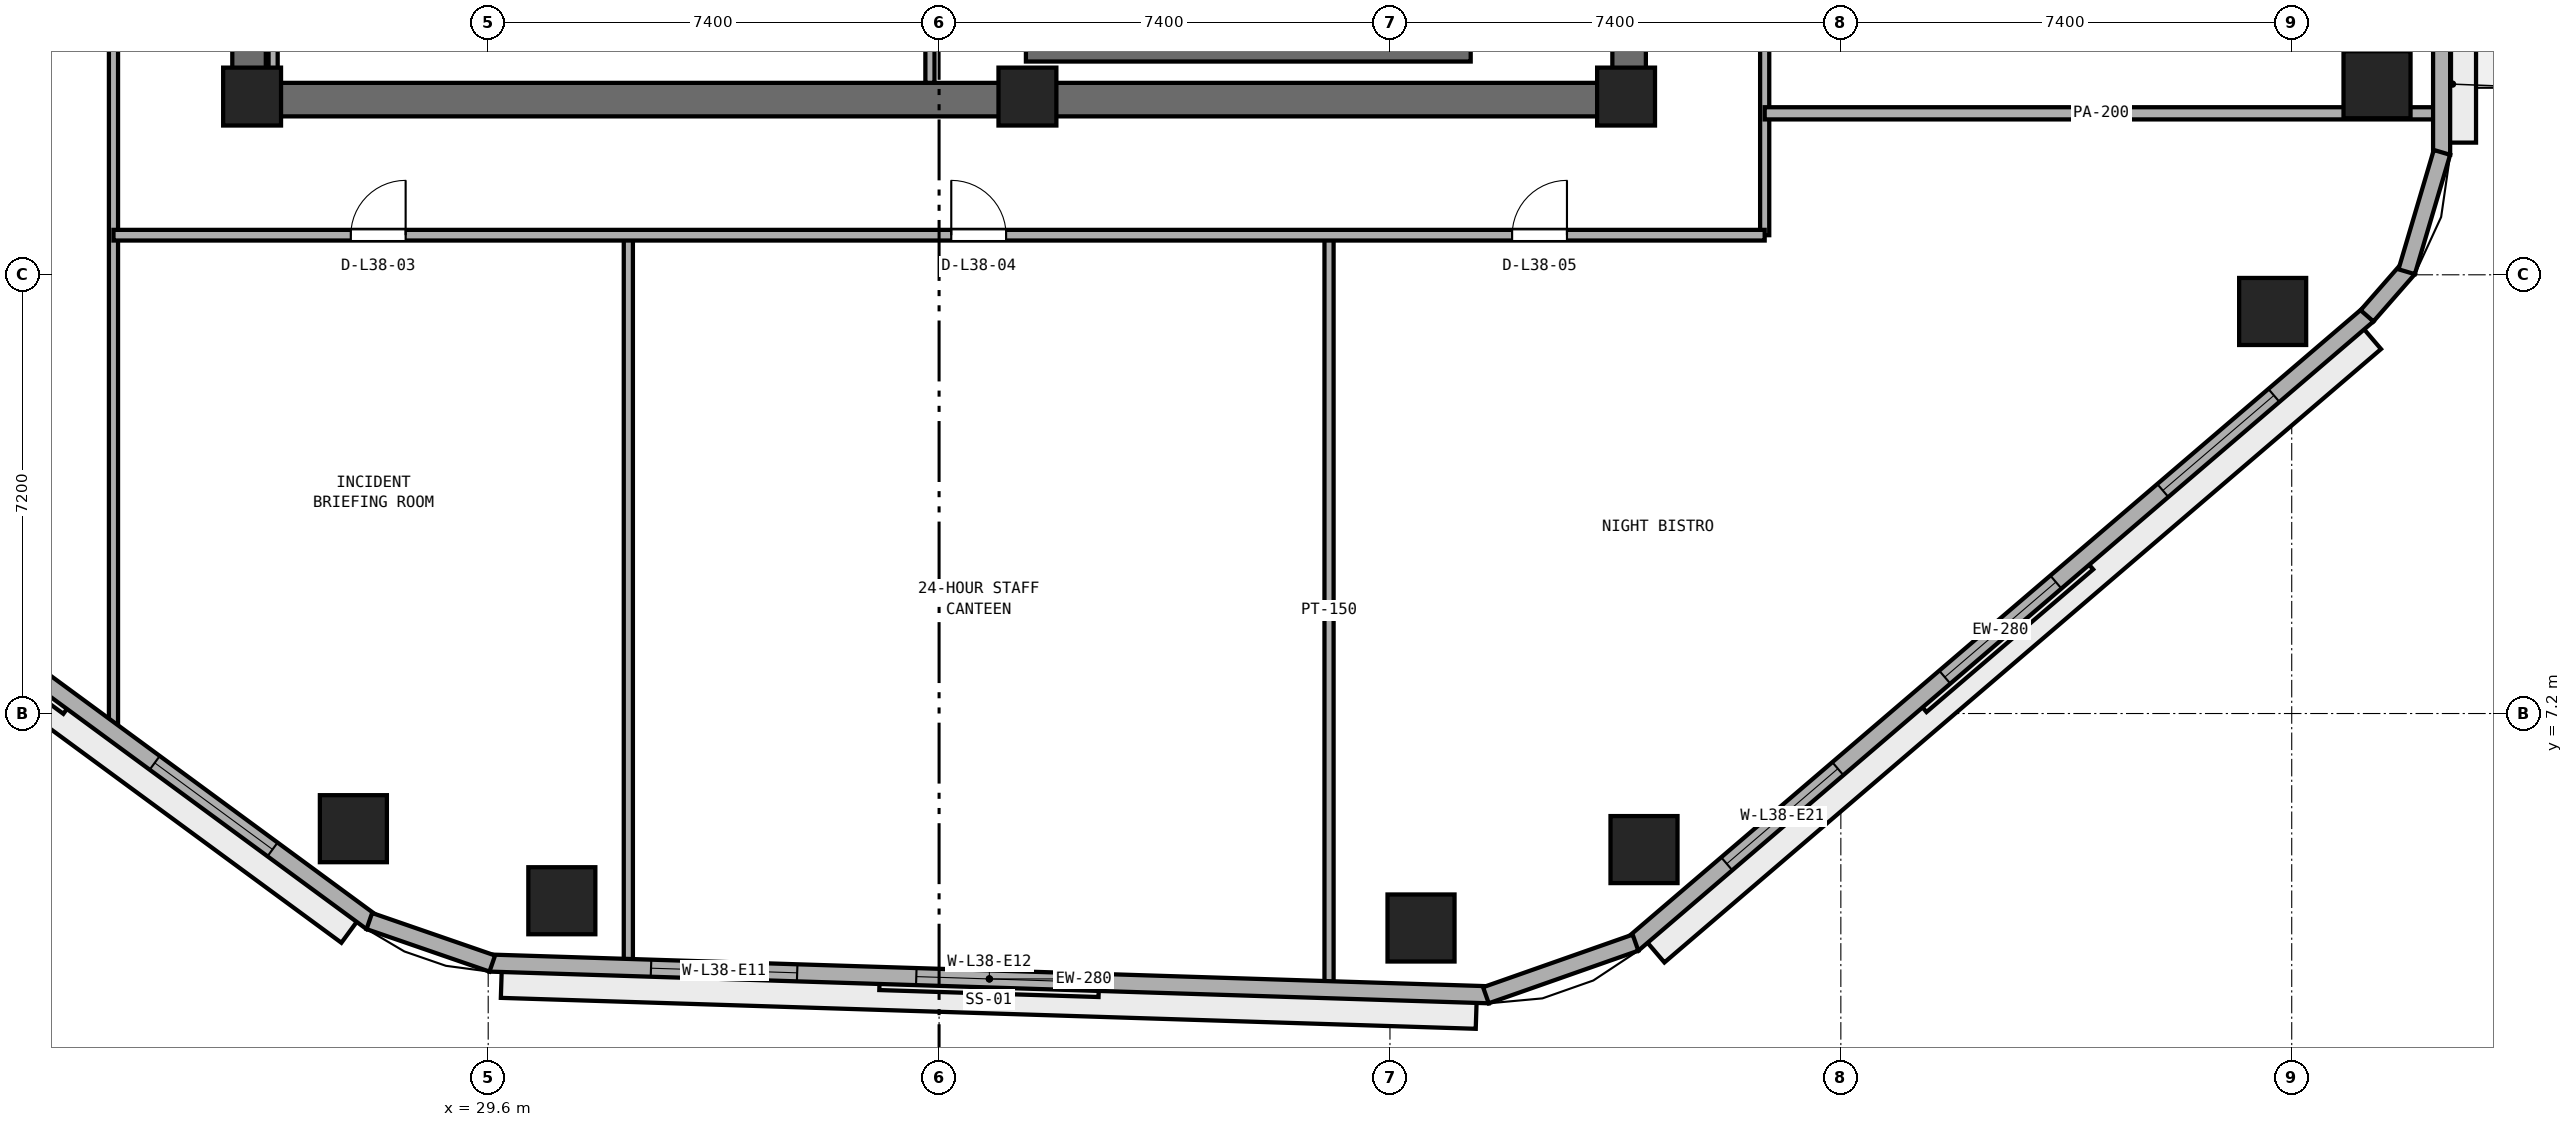
"""IFC4 building model, lengths in metres.
Left out: names, types, materials, properties, quantities, classifications, styles, units other than length and angle.
Written with IfcOpenShell. Run it as: python <this file> out.ifc"""

import sys

from ifc_helpers import new_model, si_unit, direction, frame, frame_2d, origin, origin_2d, place, context, subcontext, project, spatial, rectangle, extrude, element, fill, save


model = new_model("IFC4")
c1 = context("Model", 3, precision=1e-05, world=origin(), true_north=direction((0.0, 1.0)))
c2 = subcontext(c1, "Body", "Model", "MODEL_VIEW")
j1 = project(units=[si_unit("LENGTHUNIT", "METRE"), si_unit("PLANEANGLEUNIT", "RADIAN")], contexts=[c1])
p1 = place(None, origin())
s1 = spatial("IfcSite", under=j1, at=p1, CompositionType="ELEMENT")
p2 = place(p1, origin())
s2 = spatial("IfcBuilding", under=s1, at=p2, CompositionType="ELEMENT")
p3 = place(p2, frame((0.0, 0.0, 151.6)))
s3 = spatial("IfcBuildingStorey", under=s2, at=p3, CompositionType="ELEMENT", Elevation=151.6)
p4 = place(p3, frame((25.4, 17.275, 0.0), z_axis=(0.0, 0.0, 1.0), x_axis=(1.0, 0.0, 0.0)))
e1 = element("IfcWall", 1, at=p4, inside=s3, PredefinedType="SHEAR", context=c2, shape_type="SweptSolid", body=[
    extrude(rectangle(XDim=23.2, YDim=0.55, at=frame_2d((11.6, 0.0))), origin(), (0.0, 0.0, 1.0), 3.54),
])
p5 = place(p3, frame((25.675, 17.55, 0.0), z_axis=(0.0, 0.0, 1.0), x_axis=(0.0, 1.0, 0.0)))
e2 = element("IfcWall", 2, at=p5, inside=s3, PredefinedType="SHEAR", context=c2, shape_type="SweptSolid", body=[
    extrude(rectangle(XDim=15.3, YDim=0.55, at=frame_2d((7.65, 0.0))), origin(), (0.0, 0.0, 1.0), 3.54),
])
p6 = place(p5, frame((6.9, 0.0, 0.0)))
e3 = element("IfcOpeningElement", 3, at=p6, cuts=e2, PredefinedType="OPENING", context=c2, shape_type="SweptSolid", body=[
    extrude(rectangle(XDim=1.5, YDim=2.15, at=frame_2d((0.75, 1.075))), frame((0.0, 0.285, 0.0), z_axis=(0.0, -1.0, 0.0), x_axis=(1.0, 0.0, 0.0)), (0.0, 0.0, 1.0), 0.57),
])
p7 = place(p3, frame((48.325, 17.55, 0.0), z_axis=(0.0, 0.0, 1.0), x_axis=(0.0, 1.0, 0.0)))
e4 = element("IfcWall", 4, at=p7, inside=s3, PredefinedType="SHEAR", context=c2, shape_type="SweptSolid", body=[
    extrude(rectangle(XDim=15.3, YDim=0.55, at=frame_2d((7.65, 0.0))), origin(), (0.0, 0.0, 1.0), 3.54),
])
p8 = place(p7, frame((5.75, 0.0, 0.0)))
e5 = element("IfcOpeningElement", 5, at=p8, cuts=e4, PredefinedType="OPENING", context=c2, shape_type="SweptSolid", body=[
    extrude(rectangle(XDim=1.5, YDim=2.15, at=frame_2d((0.75, 1.075))), frame((0.0, 0.285, 0.0), z_axis=(0.0, -1.0, 0.0), x_axis=(1.0, 0.0, 0.0)), (0.0, 0.0, 1.0), 0.57),
])
for number, where, z_axis, x_axis in (
    (6, (25.725, 17.325, 0.0), (0.0, 0.0, 1.0), (1.0, 0.0, 0.0)),
    (7, (38.45, 17.325, 0.0), (0.0, 0.0, 1.0), (1.0, 0.0, 0.0)),
    (8, (48.275, 17.325, 0.0), (0.0, 0.0, 1.0), (1.0, 0.0, 0.0)),
):
    element("IfcColumn", number, at=place(p3, frame(where, z_axis=z_axis, x_axis=x_axis)), inside=s3, PredefinedType="PILASTER", context=c2, shape_type="SweptSolid", body=[
        extrude(rectangle(XDim=0.95, YDim=0.95, at=origin_2d()), origin(), (0.0, 0.0, 1.0), 3.8),
    ])
for number, where, z_axis, x_axis in (
    (9, (30.809, 4.127, 0.0), (0.0, 0.0, 1.0), (1.0, 0.0, 0.0)),
    (10, (44.91, 3.68, 0.0), (0.0, 0.0, 1.0), (1.0, 0.0, 0.0)),
    (11, (48.57, 4.967, 0.0), (0.0, 0.0, 1.0), (1.0, 0.0, 0.0)),
    (12, (58.887, 13.798, 0.0), (0.0, 0.0, 1.0), (1.0, 0.0, 0.0)),
    (13, (60.6, 17.519, 0.0), (0.0, 0.0, 1.0), (1.0, 0.0, 0.0)),
    (14, (27.387, 5.31, 0.0), (0.0, 0.0, 1.0), (1.0, 0.0, 0.0)),
):
    element("IfcColumn", number, at=place(p3, frame(where, z_axis=z_axis, x_axis=x_axis)), inside=s3, PredefinedType="COLUMN", context=c2, shape_type="SweptSolid", body=[
        extrude(rectangle(XDim=1.1, YDim=1.1, at=origin_2d()), origin(), (0.0, 0.0, 1.0), 3.8),
    ])
p9 = place(p3, frame((38.425, 18.025, 0.0), z_axis=(0.0, 0.0, 1.0), x_axis=(1.0, 0.0, 0.0)))
e15 = element("IfcWall", 15, at=p9, inside=s3, PredefinedType="SHEAR", context=c2, shape_type="SweptSolid", body=[
    extrude(rectangle(XDim=7.3, YDim=0.25, at=frame_2d((3.65, 0.0))), origin(), (0.0, 0.0, 1.0), 3.54),
])
p10 = place(p3, frame((26.07, 17.55, 0.0), z_axis=(0.0, 0.0, 1.0), x_axis=(0.0, 1.0, 0.0)))
e16 = element("IfcWall", 16, at=p10, inside=s3, PredefinedType="PARTITIONING", context=c2, shape_type="SweptSolid", body=[
    extrude(rectangle(XDim=2.2, YDim=0.15, at=frame_2d((1.1, 0.0))), origin(), (0.0, 0.0, 1.0), 2.64),
])
p11 = place(p3, frame((36.85, 17.55, 0.0), z_axis=(0.0, 0.0, 1.0), x_axis=(0.0, 1.0, 0.0)))
e17 = element("IfcWall", 17, at=p11, inside=s3, PredefinedType="PARTITIONING", context=c2, shape_type="SweptSolid", body=[
    extrude(rectangle(XDim=2.2, YDim=0.15, at=frame_2d((1.1, 0.0))), origin(), (0.0, 0.0, 1.0), 3.54),
])
p12 = place(p3, frame((50.55, 15.05, 0.0), z_axis=(0.0, 0.0, 1.0), x_axis=(0.0, 1.0, 0.0)))
e18 = element("IfcWall", 18, at=p12, inside=s3, PredefinedType="PARTITIONING", context=c2, shape_type="SweptSolid", body=[
    extrude(rectangle(XDim=8.8, YDim=0.15, at=frame_2d((4.4, 0.0))), origin(), (0.0, 0.0, 1.0), 3.54),
])
p13 = place(p3, frame((43.4, 2.732, 0.0), z_axis=(0.0, 0.0, 1.0), x_axis=(0.0, 1.0, 0.0)))
e19 = element("IfcWall", 19, at=p13, inside=s3, PredefinedType="PARTITIONING", context=c2, shape_type="SweptSolid", body=[
    extrude(rectangle(XDim=12.318, YDim=0.15, at=frame_2d((6.159, 0.0))), origin(), (0.0, 0.0, 1.0), 3.54),
])
p14 = place(p3, frame((31.9, 3.097, 0.0), z_axis=(0.0, 0.0, 1.0), x_axis=(0.0, 1.0, 0.0)))
e20 = element("IfcWall", 20, at=p14, inside=s3, PredefinedType="PARTITIONING", context=c2, shape_type="SweptSolid", body=[
    extrude(rectangle(XDim=11.953, YDim=0.15, at=frame_2d((5.976, 0.0))), origin(), (0.0, 0.0, 1.0), 3.54),
])
p15 = place(p3, frame((23.45, 6.854, 0.0), z_axis=(0.0, 0.0, 1.0), x_axis=(0.0, 1.0, 0.0)))
e21 = element("IfcWall", 21, at=p15, inside=s3, PredefinedType="PARTITIONING", context=c2, shape_type="SweptSolid", body=[
    extrude(rectangle(XDim=16.996, YDim=0.15, at=frame_2d((8.498, 0.0))), origin(), (0.0, 0.0, 1.0), 3.54),
])
p16 = place(p3, frame((23.45, 15.05, 0.0), z_axis=(0.0, 0.0, 1.0), x_axis=(1.0, 0.0, 0.0)))
e22 = element("IfcWall", 22, at=p16, inside=s3, PredefinedType="PARTITIONING", context=c2, shape_type="SweptSolid", body=[
    extrude(rectangle(XDim=27.1, YDim=0.175, at=frame_2d((13.55, 0.0))), origin(), (0.0, 0.0, 1.0), 3.54),
])
p17 = place(p16, frame((3.895, 0.0, 0.0)))
e23 = element("IfcOpeningElement", 23, at=p17, cuts=e22, PredefinedType="OPENING", context=c2, shape_type="SweptSolid", body=[
    extrude(rectangle(XDim=0.9, YDim=2.1, at=frame_2d((0.45, 1.05))), frame((0.0, 0.097, 0.0), z_axis=(0.0, -1.0, 0.0), x_axis=(1.0, 0.0, 0.0)), (0.0, 0.0, 1.0), 0.195),
])
p18 = place(p16, frame((13.75, 0.0, 0.0)))
e24 = element("IfcOpeningElement", 24, at=p18, cuts=e22, PredefinedType="OPENING", context=c2, shape_type="SweptSolid", body=[
    extrude(rectangle(XDim=0.9, YDim=2.1, at=frame_2d((0.45, 1.05))), frame((0.0, 0.097, 0.0), z_axis=(0.0, -1.0, 0.0), x_axis=(1.0, 0.0, 0.0)), (0.0, 0.0, 1.0), 0.195),
])
p19 = place(p16, frame((22.955, 0.0, 0.0)))
e25 = element("IfcOpeningElement", 25, at=p19, cuts=e22, PredefinedType="OPENING", context=c2, shape_type="SweptSolid", body=[
    extrude(rectangle(XDim=0.9, YDim=2.1, at=frame_2d((0.45, 1.05))), frame((0.0, 0.097, 0.0), z_axis=(0.0, -1.0, 0.0), x_axis=(1.0, 0.0, 0.0)), (0.0, 0.0, 1.0), 0.195),
])
p20 = place(p3, frame((50.55, 17.05, 0.0), z_axis=(0.0, 0.0, 1.0), x_axis=(1.0, 0.0, 0.0)))
e26 = element("IfcWall", 26, at=p20, inside=s3, PredefinedType="PARTITIONING", context=c2, shape_type="SweptSolid", body=[
    extrude(rectangle(XDim=11.045, YDim=0.2, at=frame_2d((5.522, 0.0))), origin(), (0.0, 0.0, 1.0), 3.54),
])
p21 = place(p3, frame((29.625, 3.104, 0.0), z_axis=(0.0, 0.0, 1.0), x_axis=(0.99949718661, -0.031707632487, 0.0)))
e27 = element("IfcWall", 27, at=p21, inside=s3, PredefinedType="STANDARD", context=c2, shape_type="SweptSolid", body=[
    extrude(rectangle(XDim=16.408, YDim=0.28, at=frame_2d((8.204, 0.0))), origin(), (0.0, 0.0, 1.0), 3.54),
])
p22 = place(p21, frame((2.648, 0.0, 0.9)))
e28 = element("IfcOpeningElement", 28, at=p22, cuts=e27, PredefinedType="OPENING", context=c2, shape_type="SweptSolid", body=[
    extrude(rectangle(XDim=2.4, YDim=1.75, at=frame_2d((1.2, 0.875))), frame((0.0, 0.15, 0.0), z_axis=(0.0, -1.0, 0.0), x_axis=(1.0, 0.0, 0.0)), (0.0, 0.0, 1.0), 0.3),
])
p23 = place(p21, frame((7.004, 0.0, 0.9)))
e29 = element("IfcOpeningElement", 29, at=p23, cuts=e27, PredefinedType="OPENING", context=c2, shape_type="SweptSolid", body=[
    extrude(rectangle(XDim=2.4, YDim=1.75, at=frame_2d((1.2, 0.875))), frame((0.0, 0.15, 0.0), z_axis=(0.0, -1.0, 0.0), x_axis=(1.0, 0.0, 0.0)), (0.0, 0.0, 1.0), 0.3),
])
p24 = place(p3, frame((48.385, 3.414, 0.0), z_axis=(0.0, 0.0, 1.0), x_axis=(0.759700260779, 0.650273414628, 0.0)))
e30 = element("IfcWall", 30, at=p24, inside=s3, PredefinedType="STANDARD", context=c2, shape_type="SweptSolid", body=[
    extrude(rectangle(XDim=15.881, YDim=0.28, at=frame_2d((7.94, 0.0))), origin(), (0.0, 0.0, 1.0), 3.54),
])
p25 = place(p24, frame((2.03, 0.0, 0.9)))
e31 = element("IfcOpeningElement", 31, at=p25, cuts=e30, PredefinedType="OPENING", context=c2, shape_type="SweptSolid", body=[
    extrude(rectangle(XDim=2.4, YDim=1.75, at=frame_2d((1.2, 0.875))), frame((0.0, 0.15, 0.0), z_axis=(0.0, -1.0, 0.0), x_axis=(1.0, 0.0, 0.0)), (0.0, 0.0, 1.0), 0.3),
])
p26 = place(p24, frame((6.74, 0.0, 0.9)))
e32 = element("IfcOpeningElement", 32, at=p26, cuts=e30, PredefinedType="OPENING", context=c2, shape_type="SweptSolid", body=[
    extrude(rectangle(XDim=2.4, YDim=1.75, at=frame_2d((1.2, 0.875))), frame((0.0, 0.15, 0.0), z_axis=(0.0, -1.0, 0.0), x_axis=(1.0, 0.0, 0.0)), (0.0, 0.0, 1.0), 0.3),
])
p27 = place(p24, frame((11.451, 0.0, 0.9)))
e33 = element("IfcOpeningElement", 33, at=p27, cuts=e30, PredefinedType="OPENING", context=c2, shape_type="SweptSolid", body=[
    extrude(rectangle(XDim=2.4, YDim=1.75, at=frame_2d((1.2, 0.875))), frame((0.0, 0.15, 0.0), z_axis=(0.0, -1.0, 0.0), x_axis=(1.0, 0.0, 0.0)), (0.0, 0.0, 1.0), 0.3),
])
p28 = place(p3, frame((61.66, 16.369, 0.0), z_axis=(0.0, 0.0, 1.0), x_axis=(0.0, 1.0, 0.0)))
e34 = element("IfcWall", 34, at=p28, inside=s3, PredefinedType="STANDARD", context=c2, shape_type="SweptSolid", body=[
    extrude(rectangle(XDim=18.902, YDim=0.28, at=frame_2d((9.451, 0.0))), origin(), (0.0, 0.0, 1.0), 3.54),
])
p29 = place(p28, frame((8.601, 0.0, 0.0)))
e35 = element("IfcOpeningElement", 35, at=p29, cuts=e34, PredefinedType="OPENING", context=c2, shape_type="SweptSolid", body=[
    extrude(rectangle(XDim=1.1, YDim=2.2, at=frame_2d((0.55, 1.1))), frame((0.0, 0.15, 0.0), z_axis=(0.0, -1.0, 0.0), x_axis=(1.0, 0.0, 0.0)), (0.0, 0.0, 1.0), 0.3),
])
p30 = place(p28, frame((2.284, 0.0, 0.9)))
e36 = element("IfcOpeningElement", 36, at=p30, cuts=e34, PredefinedType="OPENING", context=c2, shape_type="SweptSolid", body=[
    extrude(rectangle(XDim=2.4, YDim=1.75, at=frame_2d((1.2, 0.875))), frame((0.0, 0.15, 0.0), z_axis=(0.0, -1.0, 0.0), x_axis=(1.0, 0.0, 0.0)), (0.0, 0.0, 1.0), 0.3),
])
p31 = place(p28, frame((14.219, 0.0, 0.9)))
e37 = element("IfcOpeningElement", 37, at=p31, cuts=e34, PredefinedType="OPENING", context=c2, shape_type="SweptSolid", body=[
    extrude(rectangle(XDim=2.4, YDim=1.75, at=frame_2d((1.2, 0.875))), frame((0.0, 0.15, 0.0), z_axis=(0.0, -1.0, 0.0), x_axis=(1.0, 0.0, 0.0)), (0.0, 0.0, 1.0), 0.3),
])
p32 = place(p3, frame((14.951, 13.134, 0.0), z_axis=(0.0, 0.0, 1.0), x_axis=(0.805804940328, -0.592181051827, 0.0)))
e38 = element("IfcWall", 38, at=p32, inside=s3, PredefinedType="STANDARD", context=c2, shape_type="SweptSolid", body=[
    extrude(rectangle(XDim=15.804, YDim=0.28, at=frame_2d((7.902, 0.0))), origin(), (0.0, 0.0, 1.0), 3.54),
])
p33 = place(p32, frame((2.017, 0.0, 0.9)))
e39 = element("IfcOpeningElement", 39, at=p33, cuts=e38, PredefinedType="OPENING", context=c2, shape_type="SweptSolid", body=[
    extrude(rectangle(XDim=2.4, YDim=1.75, at=frame_2d((1.2, 0.875))), frame((0.0, 0.15, 0.0), z_axis=(0.0, -1.0, 0.0), x_axis=(1.0, 0.0, 0.0)), (0.0, 0.0, 1.0), 0.3),
])
p34 = place(p32, frame((6.702, 0.0, 0.9)))
e40 = element("IfcOpeningElement", 40, at=p34, cuts=e38, PredefinedType="OPENING", context=c2, shape_type="SweptSolid", body=[
    extrude(rectangle(XDim=2.4, YDim=1.75, at=frame_2d((1.2, 0.875))), frame((0.0, 0.15, 0.0), z_axis=(0.0, -1.0, 0.0), x_axis=(1.0, 0.0, 0.0)), (0.0, 0.0, 1.0), 0.3),
])
p35 = place(p32, frame((11.387, 0.0, 0.9)))
e41 = element("IfcOpeningElement", 41, at=p35, cuts=e38, PredefinedType="OPENING", context=c2, shape_type="SweptSolid", body=[
    extrude(rectangle(XDim=2.4, YDim=1.75, at=frame_2d((1.2, 0.875))), frame((0.0, 0.15, 0.0), z_axis=(0.0, -1.0, 0.0), x_axis=(1.0, 0.0, 0.0)), (0.0, 0.0, 1.0), 0.3),
])
p36 = place(p3, frame((45.975, 2.576, 0.0), z_axis=(0.0, 0.0, 1.0), x_axis=(0.943377643365, 0.331720698781, 0.0)))
e42 = element("IfcWall", 42, at=p36, inside=s3, PredefinedType="STANDARD", context=c2, shape_type="SweptSolid", body=[
    extrude(rectangle(XDim=2.603, YDim=0.28, at=frame_2d((1.301, 0.0))), origin(), (0.0, 0.0, 1.0), 3.54),
])
p37 = place(p3, frame((60.436, 13.727, 0.0), z_axis=(0.0, 0.0, 1.0), x_axis=(0.658571618609, 0.752518055041, 0.0)))
e43 = element("IfcWall", 43, at=p37, inside=s3, PredefinedType="STANDARD", context=c2, shape_type="SweptSolid", body=[
    extrude(rectangle(XDim=1.032, YDim=0.28, at=frame_2d((0.516, 0.0))), origin(), (0.0, 0.0, 1.0), 3.54),
])
p38 = place(p3, frame((61.086, 14.45, 0.0), z_axis=(0.0, 0.0, 1.0), x_axis=(0.283660953453, 0.958924639107, 0.0)))
e44 = element("IfcWall", 44, at=p38, inside=s3, PredefinedType="STANDARD", context=c2, shape_type="SweptSolid", body=[
    extrude(rectangle(XDim=2.042, YDim=0.28, at=frame_2d((1.021, 0.0))), origin(), (0.0, 0.0, 1.0), 3.54),
])
p39 = place(p3, frame((27.649, 3.794, 0.0), z_axis=(0.0, 0.0, 1.0), x_axis=(0.945149124969, -0.326639145802, 0.0)))
e45 = element("IfcWall", 45, at=p39, inside=s3, PredefinedType="STANDARD", context=c2, shape_type="SweptSolid", body=[
    extrude(rectangle(XDim=2.135, YDim=0.28, at=frame_2d((1.067, 0.0))), origin(), (0.0, 0.0, 1.0), 3.54),
])
p40 = place(p17, origin())
e46 = element("IfcDoor", 46, at=p40, inside=s3, OperationType="SINGLE_SWING_RIGHT", PredefinedType="DOOR", context=c2, shape_type="SweptSolid", body=[
    extrude(rectangle(XDim=0.9, YDim=2.1, at=frame_2d((0.45, 1.05))), frame((0.0, 0.025, 0.0), z_axis=(0.0, -1.0, 0.0), x_axis=(1.0, 0.0, 0.0)), (0.0, 0.0, 1.0), 0.05),
])
fill(e23, e46)
p41 = place(p18, origin())
e47 = element("IfcDoor", 47, at=p41, inside=s3, OperationType="SINGLE_SWING_LEFT", PredefinedType="DOOR", context=c2, shape_type="SweptSolid", body=[
    extrude(rectangle(XDim=0.9, YDim=2.1, at=frame_2d((0.45, 1.05))), frame((0.0, 0.025, 0.0), z_axis=(0.0, -1.0, 0.0), x_axis=(1.0, 0.0, 0.0)), (0.0, 0.0, 1.0), 0.05),
])
fill(e24, e47)
p42 = place(p19, origin())
e48 = element("IfcDoor", 48, at=p42, inside=s3, OperationType="SINGLE_SWING_RIGHT", PredefinedType="DOOR", context=c2, shape_type="SweptSolid", body=[
    extrude(rectangle(XDim=0.9, YDim=2.1, at=frame_2d((0.45, 1.05))), frame((0.0, 0.025, 0.0), z_axis=(0.0, -1.0, 0.0), x_axis=(1.0, 0.0, 0.0)), (0.0, 0.0, 1.0), 0.05),
])
fill(e25, e48)
p43 = place(p22, origin())
e49 = element("IfcWindow", 49, at=p43, inside=s3, PartitioningType="SINGLE_PANEL", PredefinedType="WINDOW", context=c2, shape_type="SweptSolid", body=[
    extrude(rectangle(XDim=2.4, YDim=1.75, at=frame_2d((1.2, 0.875))), frame((0.0, 0.03, 0.0), z_axis=(0.0, -1.0, 0.0), x_axis=(1.0, 0.0, 0.0)), (0.0, 0.0, 1.0), 0.06),
])
fill(e28, e49)
p44 = place(p23, origin())
e50 = element("IfcWindow", 50, at=p44, inside=s3, PartitioningType="SINGLE_PANEL", PredefinedType="WINDOW", context=c2, shape_type="SweptSolid", body=[
    extrude(rectangle(XDim=2.4, YDim=1.75, at=frame_2d((1.2, 0.875))), frame((0.0, 0.03, 0.0), z_axis=(0.0, -1.0, 0.0), x_axis=(1.0, 0.0, 0.0)), (0.0, 0.0, 1.0), 0.06),
])
fill(e29, e50)
p45 = place(p25, origin())
e51 = element("IfcWindow", 51, at=p45, inside=s3, PartitioningType="SINGLE_PANEL", PredefinedType="WINDOW", context=c2, shape_type="SweptSolid", body=[
    extrude(rectangle(XDim=2.4, YDim=1.75, at=frame_2d((1.2, 0.875))), frame((0.0, 0.03, 0.0), z_axis=(0.0, -1.0, 0.0), x_axis=(1.0, 0.0, 0.0)), (0.0, 0.0, 1.0), 0.06),
])
fill(e31, e51)
p46 = place(p26, origin())
e52 = element("IfcWindow", 52, at=p46, inside=s3, PartitioningType="SINGLE_PANEL", PredefinedType="WINDOW", context=c2, shape_type="SweptSolid", body=[
    extrude(rectangle(XDim=2.4, YDim=1.75, at=frame_2d((1.2, 0.875))), frame((0.0, 0.03, 0.0), z_axis=(0.0, -1.0, 0.0), x_axis=(1.0, 0.0, 0.0)), (0.0, 0.0, 1.0), 0.06),
])
fill(e32, e52)
p47 = place(p27, origin())
e53 = element("IfcWindow", 53, at=p47, inside=s3, PartitioningType="SINGLE_PANEL", PredefinedType="WINDOW", context=c2, shape_type="SweptSolid", body=[
    extrude(rectangle(XDim=2.4, YDim=1.75, at=frame_2d((1.2, 0.875))), frame((0.0, 0.03, 0.0), z_axis=(0.0, -1.0, 0.0), x_axis=(1.0, 0.0, 0.0)), (0.0, 0.0, 1.0), 0.06),
])
fill(e33, e53)
p48 = place(p35, origin())
e54 = element("IfcWindow", 54, at=p48, inside=s3, PartitioningType="SINGLE_PANEL", PredefinedType="WINDOW", context=c2, shape_type="SweptSolid", body=[
    extrude(rectangle(XDim=2.4, YDim=1.75, at=frame_2d((1.2, 0.875))), frame((0.0, 0.03, 0.0), z_axis=(0.0, -1.0, 0.0), x_axis=(1.0, 0.0, 0.0)), (0.0, 0.0, 1.0), 0.06),
])
fill(e41, e54)
save(model, sys.argv[1])
